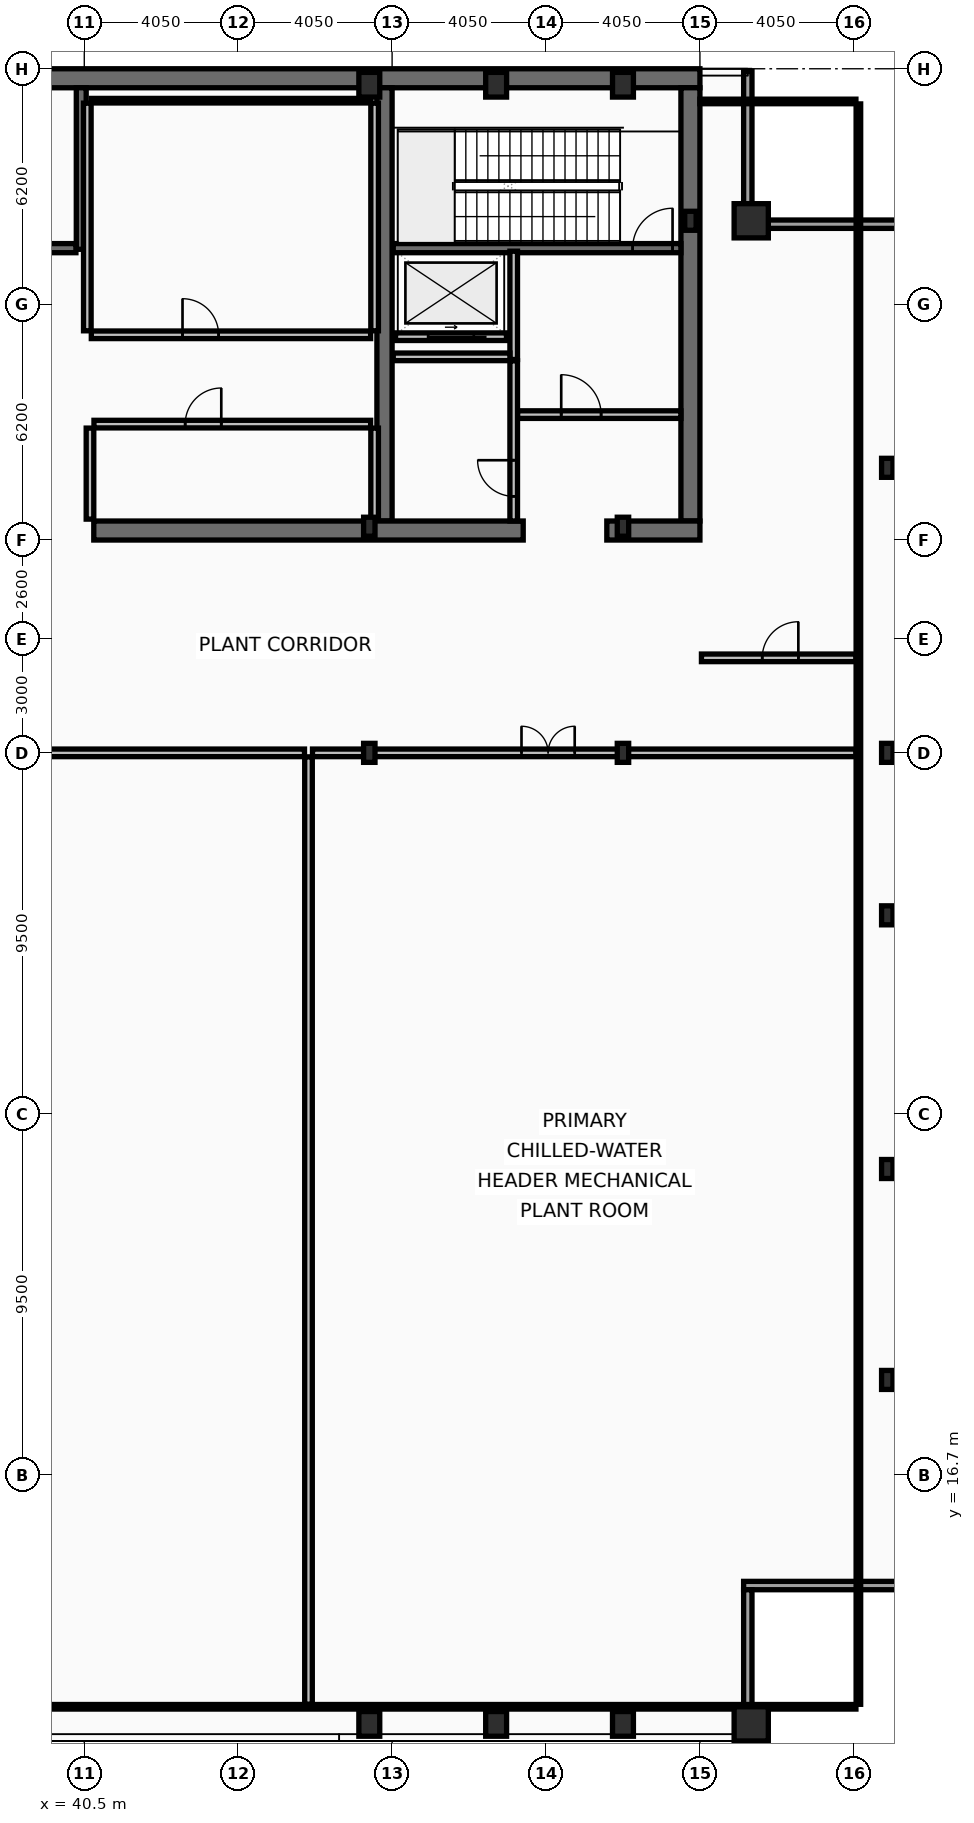
"""IFC4 building model, lengths in metres.
Left out: names, types, materials, properties, quantities, classifications, styles, units other than length and angle.
Written with IfcOpenShell. Run it as: python <this file> out.ifc"""

import sys

from ifc_helpers import new_model, si_unit, direction, frame, frame_2d, origin, origin_2d, place, context, subcontext, project, spatial, rectangle, hollow_rectangle, i_section, extrude, element, fill, save


model = new_model("IFC4")
c1 = context("Model", 3, precision=1e-05, world=origin(), true_north=direction((0.0, 1.0)))
c2 = subcontext(c1, "Body", "Model", "MODEL_VIEW")
j1 = project(units=[si_unit("LENGTHUNIT", "METRE"), si_unit("PLANEANGLEUNIT", "RADIAN")], contexts=[c1])
p1 = place(None, origin())
s1 = spatial("IfcSite", under=j1, at=p1, CompositionType="ELEMENT")
p2 = place(p1, origin())
s2 = spatial("IfcBuilding", under=s1, at=p2, CompositionType="ELEMENT")
p3 = place(p2, frame((0.0, 0.0, 367.4)))
s3 = spatial("IfcBuildingStorey", under=s2, at=p3, CompositionType="ELEMENT", Elevation=367.4)
p4 = place(p3, frame((16.2, 53.45, 0.0), z_axis=(0.0, 0.0, 1.0), x_axis=(1.0, 0.0, 0.0)))
e1 = element("IfcWall", 1, at=p4, inside=s3, PredefinedType="SHEAR", context=c2, shape_type="SweptSolid", body=[
    extrude(rectangle(XDim=40.5, YDim=0.5, at=frame_2d((20.25, 0.0))), origin(), (0.0, 0.0, 1.0), 5.4),
])
p5 = place(p3, frame((56.45, 53.2, 0.0), z_axis=(0.0, 0.0, 1.0), x_axis=(0.0, -1.0, 0.0)))
e2 = element("IfcWall", 2, at=p5, inside=s3, PredefinedType="SHEAR", context=c2, shape_type="SweptSolid", body=[
    extrude(rectangle(XDim=11.4, YDim=0.5, at=frame_2d((5.7, 0.0))), origin(), (0.0, 0.0, 1.0), 5.4),
])
p6 = place(p3, frame((48.4, 41.8, 0.0), z_axis=(0.0, 0.0, 1.0), x_axis=(0.0, 1.0, 0.0)))
e3 = element("IfcWall", 3, at=p6, inside=s3, PredefinedType="SHEAR", context=c2, shape_type="SweptSolid", body=[
    extrude(rectangle(XDim=11.4, YDim=0.4, at=frame_2d((5.7, 0.0))), origin(), (0.0, 0.0, 1.0), 5.4),
])
p7 = place(p3, frame((52.05, 41.55, 0.0), z_axis=(0.0, 0.0, 1.0), x_axis=(-1.0, 0.0, 0.0)))
e4 = element("IfcWall", 4, at=p7, inside=s3, PredefinedType="SHEAR", context=c2, shape_type="SweptSolid", body=[
    extrude(rectangle(XDim=11.3, YDim=0.5, at=frame_2d((5.65, 0.0))), origin(), (0.0, 0.0, 1.0), 5.4),
])
p8 = place(p3, frame((56.7, 41.55, 0.0), z_axis=(0.0, 0.0, 1.0), x_axis=(-1.0, 0.0, 0.0)))
e5 = element("IfcWall", 5, at=p8, inside=s3, PredefinedType="SHEAR", context=c2, shape_type="SweptSolid", body=[
    extrude(rectangle(XDim=2.45, YDim=0.5, at=frame_2d((1.225, 0.0))), origin(), (0.0, 0.0, 1.0), 5.4),
])
p9 = place(p3, frame((40.42, 48.95, 0.0), z_axis=(0.0, 0.0, 1.0), x_axis=(0.0, 1.0, 0.0)))
e6 = element("IfcWall", 6, at=p9, inside=s3, PredefinedType="SHEAR", context=c2, shape_type="SweptSolid", body=[
    extrude(rectangle(XDim=4.25, YDim=0.26, at=frame_2d((2.125, 0.0))), origin(), (0.0, 0.0, 1.0), 5.4),
])
p10 = place(p3, frame((48.63, 48.98, 0.0), z_axis=(0.0, 0.0, 1.0), x_axis=(1.0, 0.0, 0.0)))
e7 = element("IfcWall", 7, at=p10, inside=s3, PredefinedType="SHEAR", context=c2, shape_type="SweptSolid", body=[
    extrude(rectangle(XDim=7.57, YDim=0.24, at=frame_2d((3.785, 0.0))), origin(), (0.0, 0.0, 1.0), 5.4),
])
p11 = place(p10, frame((6.3, 0.0, 0.0)))
e8 = element("IfcOpeningElement", 8, at=p11, cuts=e7, PredefinedType="OPENING", context=c2, shape_type="SweptSolid", body=[
    extrude(rectangle(XDim=1.05, YDim=2.15, at=frame_2d((0.525, 1.075))), frame((0.0, 0.13, 0.0), z_axis=(0.0, -1.0, 0.0), x_axis=(1.0, 0.0, 0.0)), (0.0, 0.0, 1.0), 0.26),
])
p12 = place(p3, frame((32.72, 48.98, 0.0), z_axis=(0.0, 0.0, 1.0), x_axis=(1.0, 0.0, 0.0)))
e9 = element("IfcWall", 9, at=p12, inside=s3, PredefinedType="SHEAR", context=c2, shape_type="SweptSolid", body=[
    extrude(rectangle(XDim=7.56, YDim=0.24, at=frame_2d((3.78, 0.0))), origin(), (0.0, 0.0, 1.0), 5.4),
])
p13 = place(p12, frame((1.4, 0.0, 0.0)))
e10 = element("IfcOpeningElement", 10, at=p13, cuts=e9, PredefinedType="OPENING", context=c2, shape_type="SweptSolid", body=[
    extrude(rectangle(XDim=0.95, YDim=2.1, at=frame_2d((0.475, 1.05))), frame((0.0, 0.13, 0.0), z_axis=(0.0, -1.0, 0.0), x_axis=(1.0, 0.0, 0.0)), (0.0, 0.0, 1.0), 0.26),
])
for number, where, z_axis, x_axis in (
    (11, (58.05, 10.15, 0.0), (0.0, 0.0, 1.0), (1.0, 0.0, 0.0)),
    (12, (58.05, 49.7, 0.0), (0.0, 0.0, 1.0), (1.0, 0.0, 0.0)),
):
    element("IfcColumn", number, at=place(p3, frame(where, z_axis=z_axis, x_axis=x_axis)), inside=s3, PredefinedType="COLUMN", context=c2, shape_type="SweptSolid", body=[
        extrude(hollow_rectangle(XDim=0.9, YDim=0.9, WallThickness=0.05, at=origin_2d()), origin(), (0.0, 0.0, 1.0), 5.6),
    ])
for number, where, z_axis, x_axis in (
    (13, (48.0, 10.15, 0.0), (0.0, 0.0, 1.0), (1.0, 0.0, 0.0)),
    (14, (51.337, 10.15, 0.0), (0.0, 0.0, 1.0), (1.0, 0.0, 0.0)),
    (15, (54.675, 10.15, 0.0), (0.0, 0.0, 1.0), (1.0, 0.0, 0.0)),
    (16, (48.0, 53.28, 0.0), (0.0, 0.0, 1.0), (1.0, 0.0, 0.0)),
    (17, (51.337, 53.28, 0.0), (0.0, 0.0, 1.0), (1.0, 0.0, 0.0)),
    (18, (54.675, 53.28, 0.0), (0.0, 0.0, 1.0), (1.0, 0.0, 0.0)),
):
    element("IfcColumn", number, at=place(p3, frame(where, z_axis=z_axis, x_axis=x_axis)), inside=s3, PredefinedType="COLUMN", context=c2, shape_type="SweptSolid", body=[
        extrude(hollow_rectangle(XDim=0.55, YDim=0.65, WallThickness=0.04, at=origin_2d()), origin(), (0.0, 0.0, 1.0), 5.6),
    ])
for number, where, z_axis, x_axis in (
    (19, (61.63, 19.2, 0.0), (0.0, 0.0, 1.0), (1.0, 0.0, 0.0)),
    (20, (61.63, 24.75, 0.0), (0.0, 0.0, 1.0), (1.0, 0.0, 0.0)),
    (21, (61.63, 31.425, 0.0), (0.0, 0.0, 1.0), (1.0, 0.0, 0.0)),
    (22, (61.63, 35.7, 0.0), (0.0, 0.0, 1.0), (1.0, 0.0, 0.0)),
    (23, (61.63, 43.2, 0.0), (0.0, 0.0, 1.0), (1.0, 0.0, 0.0)),
    (24, (56.45, 49.7, 0.0), (0.0, 0.0, 1.0), (1.0, 0.0, 0.0)),
    (25, (48.0, 35.7, 0.0), (0.0, 0.0, 1.0), (1.0, 0.0, 0.0)),
    (26, (48.0, 41.65, 0.0), (0.0, 0.0, 1.0), (1.0, 0.0, 0.0)),
    (27, (54.675, 35.7, 0.0), (0.0, 0.0, 1.0), (1.0, 0.0, 0.0)),
    (28, (54.675, 41.65, 0.0), (0.0, 0.0, 1.0), (1.0, 0.0, 0.0)),
):
    element("IfcColumn", number, at=place(p3, frame(where, z_axis=z_axis, x_axis=x_axis)), inside=s3, PredefinedType="COLUMN", context=c2, shape_type="SweptSolid", body=[
        extrude(i_section(OverallWidth=0.3, OverallDepth=0.5, WebThickness=0.014, FlangeThickness=0.028, at=origin_2d()), origin(), (0.0, 0.0, 1.0), 5.6),
    ])
p14 = place(p3, frame((57.96, 53.63, 0.0), z_axis=(0.0, 0.0, 1.0), x_axis=(0.0, -1.0, 0.0)))
e29 = element("IfcWall", 29, at=p14, inside=s3, PredefinedType="SOLIDWALL", context=c2, shape_type="SweptSolid", body=[
    extrude(rectangle(XDim=3.91, YDim=0.22, at=frame_2d((1.955, 0.0))), origin(), (0.0, 0.0, 1.0), 4.84),
])
for number, where, z_axis, x_axis in (
    (30, (57.85, 49.61, 0.0), (0.0, 0.0, 1.0), (1.0, 0.0, 0.0)),
    (31, (61.98, 13.79, 0.0), (0.0, 0.0, 1.0), (-1.0, 0.0, 0.0)),
):
    element("IfcWall", number, at=place(p3, frame(where, z_axis=z_axis, x_axis=x_axis)), inside=s3, PredefinedType="SOLIDWALL", context=c2, shape_type="SweptSolid", body=[
        extrude(rectangle(XDim=4.13, YDim=0.22, at=frame_2d((2.065, 0.0))), origin(), (0.0, 0.0, 1.0), 4.84),
    ])
p15 = place(p3, frame((57.96, 13.68, 0.0), z_axis=(0.0, 0.0, 1.0), x_axis=(0.0, -1.0, 0.0)))
e32 = element("IfcWall", 32, at=p15, inside=s3, PredefinedType="SOLIDWALL", context=c2, shape_type="SweptSolid", body=[
    extrude(rectangle(XDim=3.91, YDim=0.22, at=frame_2d((1.955, 0.0))), origin(), (0.0, 0.0, 1.0), 4.84),
])
p16 = place(p3, frame((51.61, 46.65, 0.0), z_axis=(0.0, 0.0, 1.0), x_axis=(-1.0, 0.0, 0.0)))
e33 = element("IfcWall", 33, at=p16, inside=s3, PredefinedType="PARTITIONING", context=c2, shape_type="SweptSolid", body=[
    extrude(rectangle(XDim=2.92, YDim=0.2, at=frame_2d((1.46, 0.0))), origin(), (0.0, 0.0, 1.0), 5.4),
])
p17 = place(p16, frame((0.86, 0.0, 0.0)))
e34 = element("IfcOpeningElement", 34, at=p17, cuts=e33, PredefinedType="OPENING", context=c2, shape_type="SweptSolid", body=[
    extrude(rectangle(XDim=1.2, YDim=2.18, at=frame_2d((0.6, 1.09))), frame((0.0, 0.11, 0.0), z_axis=(0.0, -1.0, 0.0), x_axis=(1.0, 0.0, 0.0)), (0.0, 0.0, 1.0), 0.22),
])
p18 = place(p3, frame((51.8, 46.05, 0.0), z_axis=(0.0, 0.0, 1.0), x_axis=(0.0, 1.0, 0.0)))
e35 = element("IfcWall", 35, at=p18, inside=s3, PredefinedType="PARTITIONING", context=c2, shape_type="SweptSolid", body=[
    extrude(rectangle(XDim=2.85, YDim=0.2, at=frame_2d((1.425, 0.0))), origin(), (0.0, 0.0, 1.0), 5.4),
])
p19 = place(p3, frame((51.9, 44.6, 0.0), z_axis=(0.0, 0.0, 1.0), x_axis=(1.0, 0.0, 0.0)))
e36 = element("IfcWall", 36, at=p19, inside=s3, PredefinedType="PARTITIONING", context=c2, shape_type="SweptSolid", body=[
    extrude(rectangle(XDim=4.3, YDim=0.2, at=frame_2d((2.15, 0.0))), origin(), (0.0, 0.0, 1.0), 5.4),
])
p20 = place(p19, frame((1.15, 0.0, 0.0)))
e37 = element("IfcOpeningElement", 37, at=p20, cuts=e36, PredefinedType="OPENING", context=c2, shape_type="SweptSolid", body=[
    extrude(rectangle(XDim=1.05, YDim=2.15, at=frame_2d((0.525, 1.075))), frame((0.0, 0.11, 0.0), z_axis=(0.0, -1.0, 0.0), x_axis=(1.0, 0.0, 0.0)), (0.0, 0.0, 1.0), 0.22),
])
p21 = place(p3, frame((48.63, 46.12, 0.0), z_axis=(0.0, 0.0, 1.0), x_axis=(1.0, 0.0, 0.0)))
e38 = element("IfcWall", 38, at=p21, inside=s3, PredefinedType="PARTITIONING", context=c2, shape_type="SweptSolid", body=[
    extrude(rectangle(XDim=3.07, YDim=0.2, at=frame_2d((1.535, 0.0))), origin(), (0.0, 0.0, 1.0), 5.4),
])
p22 = place(p3, frame((51.8, 41.8, 0.0), z_axis=(0.0, 0.0, 1.0), x_axis=(0.0, 1.0, 0.0)))
e39 = element("IfcWall", 39, at=p22, inside=s3, PredefinedType="PARTITIONING", context=c2, shape_type="SweptSolid", body=[
    extrude(rectangle(XDim=4.215, YDim=0.2, at=frame_2d((2.107, 0.0))), origin(), (0.0, 0.0, 1.0), 5.4),
])
p23 = place(p22, frame((0.65, 0.0, 0.0)))
e40 = element("IfcOpeningElement", 40, at=p23, cuts=e39, PredefinedType="OPENING", context=c2, shape_type="SweptSolid", body=[
    extrude(rectangle(XDim=0.95, YDim=2.1, at=frame_2d((0.475, 1.05))), frame((0.0, 0.11, 0.0), z_axis=(0.0, -1.0, 0.0), x_axis=(1.0, 0.0, 0.0)), (0.0, 0.0, 1.0), 0.22),
])
for number, where, z_axis, x_axis in (
    (41, (40.58, 46.805, 0.0), (0.0, 0.0, 1.0), (0.0, 1.0, 0.0)),
    (42, (48.14, 46.805, 0.0), (0.0, 0.0, 1.0), (0.0, 1.0, 0.0)),
):
    element("IfcWall", number, at=place(p3, frame(where, z_axis=z_axis, x_axis=x_axis)), inside=s3, PredefinedType="PARTITIONING", context=c2, shape_type="SweptSolid", body=[
        extrude(rectangle(XDim=5.99, YDim=0.2, at=frame_2d((2.995, 0.0))), origin(), (0.0, 0.0, 1.0), 5.4),
    ])
p24 = place(p3, frame((40.685, 52.86, 0.0), z_axis=(0.0, 0.0, 1.0), x_axis=(1.0, 0.0, 0.0)))
e43 = element("IfcWall", 43, at=p24, inside=s3, PredefinedType="PARTITIONING", context=c2, shape_type="SweptSolid", body=[
    extrude(rectangle(XDim=7.35, YDim=0.12, at=frame_2d((3.675, 0.0))), origin(), (0.0, 0.0, 1.0), 5.4),
])
p25 = place(p3, frame((40.685, 46.7, 0.0), z_axis=(0.0, 0.0, 1.0), x_axis=(1.0, 0.0, 0.0)))
e44 = element("IfcWall", 44, at=p25, inside=s3, PredefinedType="PARTITIONING", context=c2, shape_type="SweptSolid", body=[
    extrude(rectangle(XDim=7.35, YDim=0.2, at=frame_2d((3.675, 0.0))), origin(), (0.0, 0.0, 1.0), 5.4),
])
p26 = place(p25, frame((2.4, 0.0, 0.0)))
e45 = element("IfcOpeningElement", 45, at=p26, cuts=e44, PredefinedType="OPENING", context=c2, shape_type="SweptSolid", body=[
    extrude(rectangle(XDim=0.95, YDim=2.1, at=frame_2d((0.475, 1.05))), frame((0.0, 0.11, 0.0), z_axis=(0.0, -1.0, 0.0), x_axis=(1.0, 0.0, 0.0)), (0.0, 0.0, 1.0), 0.22),
])
for number, where, z_axis, x_axis in (
    (46, (40.65, 41.85, 0.0), (0.0, 0.0, 1.0), (0.0, 1.0, 0.0)),
    (47, (48.14, 41.85, 0.0), (0.0, 0.0, 1.0), (0.0, 1.0, 0.0)),
):
    element("IfcWall", number, at=place(p3, frame(where, z_axis=z_axis, x_axis=x_axis)), inside=s3, PredefinedType="PARTITIONING", context=c2, shape_type="SweptSolid", body=[
        extrude(rectangle(XDim=2.395, YDim=0.2, at=frame_2d((1.198, 0.0))), origin(), (0.0, 0.0, 1.0), 5.4),
    ])
p27 = place(p3, frame((40.755, 44.35, 0.0), z_axis=(0.0, 0.0, 1.0), x_axis=(1.0, 0.0, 0.0)))
e48 = element("IfcWall", 48, at=p27, inside=s3, PredefinedType="PARTITIONING", context=c2, shape_type="SweptSolid", body=[
    extrude(rectangle(XDim=7.28, YDim=0.2, at=frame_2d((3.64, 0.0))), origin(), (0.0, 0.0, 1.0), 5.4),
])
p28 = place(p27, frame((2.4, 0.0, 0.0)))
e49 = element("IfcOpeningElement", 49, at=p28, cuts=e48, PredefinedType="OPENING", context=c2, shape_type="SweptSolid", body=[
    extrude(rectangle(XDim=0.95, YDim=2.1, at=frame_2d((0.475, 1.05))), frame((0.0, 0.11, 0.0), z_axis=(0.0, -1.0, 0.0), x_axis=(1.0, 0.0, 0.0)), (0.0, 0.0, 1.0), 0.22),
])
p29 = place(p3, frame((26.605, 35.7, 0.0), z_axis=(0.0, 0.0, 1.0), x_axis=(1.0, 0.0, 0.0)))
e50 = element("IfcWall", 50, at=p29, inside=s3, PredefinedType="PARTITIONING", context=c2, shape_type="SweptSolid", body=[
    extrude(rectangle(XDim=19.69, YDim=0.2, at=frame_2d((9.845, 0.0))), origin(), (0.0, 0.0, 1.0), 5.03),
])
p30 = place(p29, frame((8.5, 0.0, 0.0)))
e51 = element("IfcOpeningElement", 51, at=p30, cuts=e50, PredefinedType="OPENING", context=c2, shape_type="SweptSolid", body=[
    extrude(rectangle(XDim=1.4, YDim=2.15, at=frame_2d((0.7, 1.075))), frame((0.0, 0.11, 0.0), z_axis=(0.0, -1.0, 0.0), x_axis=(1.0, 0.0, 0.0)), (0.0, 0.0, 1.0), 0.22),
])
p31 = place(p3, frame((46.505, 35.7, 0.0), z_axis=(0.0, 0.0, 1.0), x_axis=(1.0, 0.0, 0.0)))
e52 = element("IfcWall", 52, at=p31, inside=s3, PredefinedType="PARTITIONING", context=c2, shape_type="SweptSolid", body=[
    extrude(rectangle(XDim=14.3, YDim=0.2, at=frame_2d((7.15, 0.0))), origin(), (0.0, 0.0, 1.0), 4.79),
])
p32 = place(p31, frame((5.5, 0.0, 0.0)))
e53 = element("IfcOpeningElement", 53, at=p32, cuts=e52, PredefinedType="OPENING", context=c2, shape_type="SweptSolid", body=[
    extrude(rectangle(XDim=1.4, YDim=2.15, at=frame_2d((0.7, 1.075))), frame((0.0, 0.11, 0.0), z_axis=(0.0, -1.0, 0.0), x_axis=(1.0, 0.0, 0.0)), (0.0, 0.0, 1.0), 0.22),
])
p33 = place(p3, frame((46.4, 10.665, 0.0), z_axis=(0.0, 0.0, 1.0), x_axis=(0.0, 1.0, 0.0)))
e54 = element("IfcWall", 54, at=p33, inside=s3, PredefinedType="PARTITIONING", context=c2, shape_type="SweptSolid", body=[
    extrude(rectangle(XDim=24.93, YDim=0.2, at=frame_2d((12.465, 0.0))), origin(), (0.0, 0.0, 1.0), 5.03),
])
p34 = place(p3, frame((56.74, 38.2, 0.0), z_axis=(0.0, 0.0, 1.0), x_axis=(1.0, 0.0, 0.0)))
e55 = element("IfcWall", 55, at=p34, inside=s3, PredefinedType="PARTITIONING", context=c2, shape_type="SweptSolid", body=[
    extrude(rectangle(XDim=4.065, YDim=0.2, at=frame_2d((2.032, 0.0))), origin(), (0.0, 0.0, 1.0), 5.4),
])
p35 = place(p34, frame((1.6, 0.0, 0.0)))
e56 = element("IfcOpeningElement", 56, at=p35, cuts=e55, PredefinedType="OPENING", context=c2, shape_type="SweptSolid", body=[
    extrude(rectangle(XDim=0.95, YDim=2.1, at=frame_2d((0.475, 1.05))), frame((0.0, 0.11, 0.0), z_axis=(0.0, -1.0, 0.0), x_axis=(1.0, 0.0, 0.0)), (0.0, 0.0, 1.0), 0.22),
])
p36 = place(p3, frame((60.87, 10.665, 0.0), z_axis=(0.0, 0.0, 1.0), x_axis=(0.0, 1.0, 0.0)))
e57 = element("IfcWall", 57, at=p36, inside=s3, PredefinedType="PARTITIONING", context=c2, shape_type="SweptSolid", body=[
    extrude(rectangle(XDim=42.11, YDim=0.12, at=frame_2d((21.055, 0.0))), origin(), (0.0, 0.0, 1.0), 4.79),
])
p37 = place(p3, frame((56.7, 52.84, 0.0), z_axis=(0.0, 0.0, 1.0), x_axis=(1.0, 0.0, 0.0)))
e58 = element("IfcWall", 58, at=p37, inside=s3, PredefinedType="PARTITIONING", context=c2, shape_type="SweptSolid", body=[
    extrude(rectangle(XDim=4.105, YDim=0.12, at=frame_2d((2.052, 0.0))), origin(), (0.0, 0.0, 1.0), 5.4),
])
p38 = place(p3, frame((12.095, 10.6, 0.0), z_axis=(0.0, 0.0, 1.0), x_axis=(1.0, 0.0, 0.0)))
e59 = element("IfcWall", 59, at=p38, inside=s3, PredefinedType="PARTITIONING", context=c2, shape_type="SweptSolid", body=[
    extrude(rectangle(XDim=48.71, YDim=0.12, at=frame_2d((24.355, 0.0))), origin(), (0.0, 0.0, 1.0), 4.79),
])
p39 = place(p11, origin())
e60 = element("IfcDoor", 60, at=p39, inside=s3, OperationType="SINGLE_SWING_RIGHT", PredefinedType="DOOR", context=c2, shape_type="SweptSolid", body=[
    extrude(rectangle(XDim=1.05, YDim=2.15, at=frame_2d((0.525, 1.075))), frame((0.0, 0.025, 0.0), z_axis=(0.0, -1.0, 0.0), x_axis=(1.0, 0.0, 0.0)), (0.0, 0.0, 1.0), 0.05),
])
fill(e8, e60)
p40 = place(p17, origin())
e61 = element("IfcDoor", 61, at=p40, inside=s3, OperationType="SLIDING_TO_LEFT", PredefinedType="DOOR", context=c2, shape_type="SweptSolid", body=[
    extrude(rectangle(XDim=1.2, YDim=2.18, at=frame_2d((0.6, 1.09))), frame((0.0, 0.025, 0.0), z_axis=(0.0, -1.0, 0.0), x_axis=(1.0, 0.0, 0.0)), (0.0, 0.0, 1.0), 0.05),
])
fill(e34, e61)
p41 = place(p20, origin())
e62 = element("IfcDoor", 62, at=p41, inside=s3, OperationType="SINGLE_SWING_LEFT", PredefinedType="DOOR", context=c2, shape_type="SweptSolid", body=[
    extrude(rectangle(XDim=1.05, YDim=2.15, at=frame_2d((0.525, 1.075))), frame((0.0, 0.025, 0.0), z_axis=(0.0, -1.0, 0.0), x_axis=(1.0, 0.0, 0.0)), (0.0, 0.0, 1.0), 0.05),
])
fill(e37, e62)
p42 = place(p23, origin())
e63 = element("IfcDoor", 63, at=p42, inside=s3, OperationType="SINGLE_SWING_RIGHT", PredefinedType="DOOR", context=c2, shape_type="SweptSolid", body=[
    extrude(rectangle(XDim=0.95, YDim=2.1, at=frame_2d((0.475, 1.05))), frame((0.0, 0.025, 0.0), z_axis=(0.0, -1.0, 0.0), x_axis=(1.0, 0.0, 0.0)), (0.0, 0.0, 1.0), 0.05),
])
fill(e40, e63)
p43 = place(p26, origin())
e64 = element("IfcDoor", 64, at=p43, inside=s3, OperationType="SINGLE_SWING_LEFT", PredefinedType="DOOR", context=c2, shape_type="SweptSolid", body=[
    extrude(rectangle(XDim=0.95, YDim=2.1, at=frame_2d((0.475, 1.05))), frame((0.0, 0.025, 0.0), z_axis=(0.0, -1.0, 0.0), x_axis=(1.0, 0.0, 0.0)), (0.0, 0.0, 1.0), 0.05),
])
fill(e45, e64)
p44 = place(p28, origin())
e65 = element("IfcDoor", 65, at=p44, inside=s3, OperationType="SINGLE_SWING_RIGHT", PredefinedType="DOOR", context=c2, shape_type="SweptSolid", body=[
    extrude(rectangle(XDim=0.95, YDim=2.1, at=frame_2d((0.475, 1.05))), frame((0.0, 0.025, 0.0), z_axis=(0.0, -1.0, 0.0), x_axis=(1.0, 0.0, 0.0)), (0.0, 0.0, 1.0), 0.05),
])
fill(e49, e65)
p45 = place(p32, origin())
e66 = element("IfcDoor", 66, at=p45, inside=s3, OperationType="DOUBLE_DOOR_SINGLE_SWING", PredefinedType="DOOR", context=c2, shape_type="SweptSolid", body=[
    extrude(rectangle(XDim=1.4, YDim=2.15, at=frame_2d((0.7, 1.075))), frame((0.0, 0.025, 0.0), z_axis=(0.0, -1.0, 0.0), x_axis=(1.0, 0.0, 0.0)), (0.0, 0.0, 1.0), 0.05),
])
fill(e53, e66)
p46 = place(p35, origin())
e67 = element("IfcDoor", 67, at=p46, inside=s3, OperationType="SINGLE_SWING_RIGHT", PredefinedType="DOOR", context=c2, shape_type="SweptSolid", body=[
    extrude(rectangle(XDim=0.95, YDim=2.1, at=frame_2d((0.475, 1.05))), frame((0.0, 0.025, 0.0), z_axis=(0.0, -1.0, 0.0), x_axis=(1.0, 0.0, 0.0)), (0.0, 0.0, 1.0), 0.05),
])
fill(e56, e67)
save(model, sys.argv[1])
